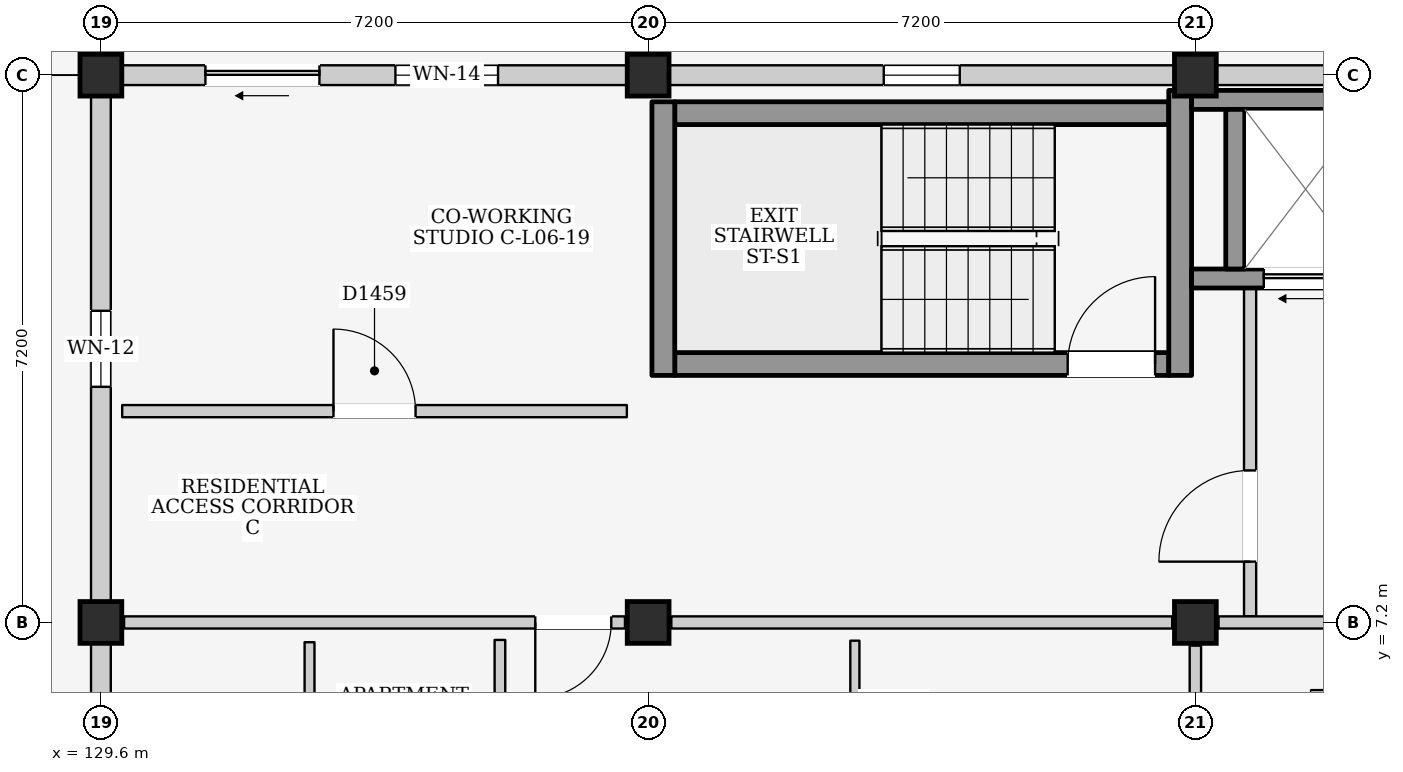
"""IFC4 building model, lengths in metres.
Left out: names, types, materials, properties, quantities, classifications, styles, units other than length and angle.
Written with IfcOpenShell. Run it as: python <this file> out.ifc"""

import sys

from ifc_helpers import new_model, si_unit, direction, frame, frame_2d, origin, origin_2d, place, context, subcontext, project, spatial, rectangle, extrude, element, fill, save


model = new_model("IFC4")
c1 = context("Model", 3, precision=1e-05, world=origin(), true_north=direction((0.0, 1.0)))
c2 = subcontext(c1, "Body", "Model", "MODEL_VIEW")
j1 = project(units=[si_unit("LENGTHUNIT", "METRE"), si_unit("PLANEANGLEUNIT", "RADIAN")], contexts=[c1])
p1 = place(None, origin())
s1 = spatial("IfcSite", under=j1, at=p1, CompositionType="ELEMENT")
p2 = place(p1, origin())
s2 = spatial("IfcBuilding", under=s1, at=p2, CompositionType="ELEMENT")
p3 = place(p2, frame((0.0, 0.0, 21.9)))
s3 = spatial("IfcBuildingStorey", under=s2, at=p3, CompositionType="ELEMENT", Elevation=21.9)
for number, where, z_axis, x_axis in (
    (1, (129.6, 7.2, 0.0), (0.0, 0.0, 1.0), (1.0, 0.0, 0.0)),
    (2, (129.6, 14.4, 0.0), (0.0, 0.0, 1.0), (1.0, 0.0, 0.0)),
    (3, (136.8, 7.2, 0.0), (0.0, 0.0, 1.0), (1.0, 0.0, 0.0)),
    (4, (136.8, 14.4, 0.0), (0.0, 0.0, 1.0), (1.0, 0.0, 0.0)),
    (5, (144.0, 7.2, 0.0), (0.0, 0.0, 1.0), (1.0, 0.0, 0.0)),
    (6, (144.0, 14.4, 0.0), (0.0, 0.0, 1.0), (1.0, 0.0, 0.0)),
):
    element("IfcColumn", number, at=place(p3, frame(where, z_axis=z_axis, x_axis=x_axis)), inside=s3, PredefinedType="COLUMN", context=c2, shape_type="SweptSolid", body=[
        extrude(rectangle(XDim=0.55, YDim=0.55, at=origin_2d()), origin(), (0.0, 0.0, 1.0), 3.2),
    ])
p4 = place(p3, frame((129.6, 0.275, 0.0), z_axis=(0.0, 0.0, 1.0), x_axis=(0.0, 1.0, 0.0)))
e7 = element("IfcWall", 7, at=p4, inside=s3, PredefinedType="ELEMENTEDWALL", context=c2, shape_type="SweptSolid", body=[
    extrude(rectangle(XDim=6.65, YDim=0.26, at=frame_2d((3.325, 0.0))), origin(), (0.0, 0.0, 1.0), 2.465),
])
p5 = place(p4, frame((1.4, 0.0, 0.0)))
e8 = element("IfcOpeningElement", 8, at=p5, cuts=e7, PredefinedType="OPENING", context=c2, shape_type="SweptSolid", body=[
    extrude(rectangle(XDim=1.4, YDim=2.1, at=frame_2d((0.7, 1.05))), frame((0.0, 0.145, 0.0), z_axis=(0.0, -1.0, 0.0), x_axis=(1.0, 0.0, 0.0)), (0.0, 0.0, 1.0), 0.29),
])
p6 = place(p4, frame((4.4, 0.0, 0.95)))
e9 = element("IfcOpeningElement", 9, at=p6, cuts=e7, PredefinedType="OPENING", context=c2, shape_type="SweptSolid", body=[
    extrude(rectangle(XDim=1.2, YDim=1.35, at=frame_2d((0.6, 0.675))), frame((0.0, 0.145, 0.0), z_axis=(0.0, -1.0, 0.0), x_axis=(1.0, 0.0, 0.0)), (0.0, 0.0, 1.0), 0.29),
])
p7 = place(p3, frame((129.875, 14.4, 0.0), z_axis=(0.0, 0.0, 1.0), x_axis=(1.0, 0.0, 0.0)))
e10 = element("IfcWall", 10, at=p7, inside=s3, PredefinedType="ELEMENTEDWALL", context=c2, shape_type="SweptSolid", body=[
    extrude(rectangle(XDim=6.65, YDim=0.26, at=frame_2d((3.325, 0.0))), origin(), (0.0, 0.0, 1.0), 2.365),
])
p8 = place(p7, frame((1.1, 0.0, 0.0)))
e11 = element("IfcOpeningElement", 11, at=p8, cuts=e10, PredefinedType="OPENING", context=c2, shape_type="SweptSolid", body=[
    extrude(rectangle(XDim=1.5, YDim=2.12, at=frame_2d((0.75, 1.06))), frame((0.0, 0.145, 0.0), z_axis=(0.0, -1.0, 0.0), x_axis=(1.0, 0.0, 0.0)), (0.0, 0.0, 1.0), 0.29),
])
p9 = place(p7, frame((3.6, 0.0, 0.755)))
e12 = element("IfcOpeningElement", 12, at=p9, cuts=e10, PredefinedType="OPENING", context=c2, shape_type="SweptSolid", body=[
    extrude(rectangle(XDim=1.35, YDim=1.5, at=frame_2d((0.675, 0.75))), frame((0.0, 0.145, 0.0), z_axis=(0.0, -1.0, 0.0), x_axis=(1.0, 0.0, 0.0)), (0.0, 0.0, 1.0), 0.29),
])
p10 = place(p3, frame((129.6, 7.475, 0.0), z_axis=(0.0, 0.0, 1.0), x_axis=(0.0, 1.0, 0.0)))
e13 = element("IfcWall", 13, at=p10, inside=s3, PredefinedType="ELEMENTEDWALL", context=c2, shape_type="SweptSolid", body=[
    extrude(rectangle(XDim=6.65, YDim=0.26, at=frame_2d((3.325, 0.0))), origin(), (0.0, 0.0, 1.0), 2.465),
])
p11 = place(p10, frame((2.825, 0.0, 1.1)))
e14 = element("IfcOpeningElement", 14, at=p11, cuts=e13, PredefinedType="OPENING", context=c2, shape_type="SweptSolid", body=[
    extrude(rectangle(XDim=1.0, YDim=0.9, at=frame_2d((0.5, 0.45))), frame((0.0, 0.145, 0.0), z_axis=(0.0, -1.0, 0.0), x_axis=(1.0, 0.0, 0.0)), (0.0, 0.0, 1.0), 0.29),
])
p12 = place(p3, frame((137.075, 14.4, 0.0), z_axis=(0.0, 0.0, 1.0), x_axis=(1.0, 0.0, 0.0)))
e15 = element("IfcWall", 15, at=p12, inside=s3, PredefinedType="ELEMENTEDWALL", context=c2, shape_type="SweptSolid", body=[
    extrude(rectangle(XDim=6.65, YDim=0.26, at=frame_2d((3.325, 0.0))), origin(), (0.0, 0.0, 1.0), 2.365),
])
p13 = place(p12, frame((2.825, 0.0, 1.2)))
e16 = element("IfcOpeningElement", 16, at=p13, cuts=e15, PredefinedType="OPENING", context=c2, shape_type="SweptSolid", body=[
    extrude(rectangle(XDim=1.0, YDim=0.9, at=frame_2d((0.5, 0.45))), frame((0.0, 0.145, 0.0), z_axis=(0.0, -1.0, 0.0), x_axis=(1.0, 0.0, 0.0)), (0.0, 0.0, 1.0), 0.29),
])
p14 = place(p3, frame((144.275, 14.4, 0.0), z_axis=(0.0, 0.0, 1.0), x_axis=(1.0, 0.0, 0.0)))
e17 = element("IfcWall", 17, at=p14, inside=s3, PredefinedType="ELEMENTEDWALL", context=c2, shape_type="SweptSolid", body=[
    extrude(rectangle(XDim=6.65, YDim=0.26, at=frame_2d((3.325, 0.0))), origin(), (0.0, 0.0, 1.0), 2.365),
])
p15 = place(p14, frame((2.825, 0.0, 1.2)))
e18 = element("IfcOpeningElement", 18, at=p15, cuts=e17, PredefinedType="OPENING", context=c2, shape_type="SweptSolid", body=[
    extrude(rectangle(XDim=1.0, YDim=0.9, at=frame_2d((0.5, 0.45))), frame((0.0, 0.145, 0.0), z_axis=(0.0, -1.0, 0.0), x_axis=(1.0, 0.0, 0.0)), (0.0, 0.0, 1.0), 0.29),
])
p16 = place(p3, frame((137.15, 10.6, 0.0), z_axis=(0.0, 0.0, 1.0), x_axis=(1.0, 0.0, 0.0)))
e19 = element("IfcWall", 19, at=p16, inside=s3, PredefinedType="SHEAR", context=c2, shape_type="SweptSolid", body=[
    extrude(rectangle(XDim=6.5, YDim=0.3, at=frame_2d((3.25, 0.0))), origin(), (0.0, 0.0, 1.0), 2.98),
])
p17 = place(p16, frame((5.17, 0.0, 0.0)))
e20 = element("IfcOpeningElement", 20, at=p17, cuts=e19, PredefinedType="OPENING", context=c2, shape_type="SweptSolid", body=[
    extrude(rectangle(XDim=1.15, YDim=2.2, at=frame_2d((0.575, 1.1))), frame((0.0, 0.165, 0.0), z_axis=(0.0, -1.0, 0.0), x_axis=(1.0, 0.0, 0.0)), (0.0, 0.0, 1.0), 0.33),
])
p18 = place(p3, frame((137.15, 13.9, 0.0), z_axis=(0.0, 0.0, 1.0), x_axis=(1.0, 0.0, 0.0)))
e21 = element("IfcWall", 21, at=p18, inside=s3, PredefinedType="SHEAR", context=c2, shape_type="SweptSolid", body=[
    extrude(rectangle(XDim=6.5, YDim=0.3, at=frame_2d((3.25, 0.0))), origin(), (0.0, 0.0, 1.0), 2.98),
])
p19 = place(p3, frame((137.0, 10.45, 0.0), z_axis=(0.0, 0.0, 1.0), x_axis=(0.0, 1.0, 0.0)))
e22 = element("IfcWall", 22, at=p19, inside=s3, PredefinedType="SHEAR", context=c2, shape_type="SweptSolid", body=[
    extrude(rectangle(XDim=3.6, YDim=0.3, at=frame_2d((1.8, 0.0))), origin(), (0.0, 0.0, 1.0), 2.98),
])
p20 = place(p3, frame((143.8, 10.45, 0.0), z_axis=(0.0, 0.0, 1.0), x_axis=(0.0, 1.0, 0.0)))
e23 = element("IfcWall", 23, at=p20, inside=s3, PredefinedType="SHEAR", context=c2, shape_type="SweptSolid", body=[
    extrude(rectangle(XDim=3.75, YDim=0.3, at=frame_2d((1.875, 0.0))), origin(), (0.0, 0.0, 1.0), 2.98),
])
p21 = place(p3, frame((144.72, 7.28, 0.0), z_axis=(0.0, 0.0, 1.0), x_axis=(0.0, 1.0, 0.0)))
e24 = element("IfcWall", 24, at=p21, inside=s3, PredefinedType="PARTITIONING", context=c2, shape_type="SweptSolid", body=[
    extrude(rectangle(XDim=4.32, YDim=0.16, at=frame_2d((2.16, 0.0))), origin(), (0.0, 0.0, 1.0), 2.98),
])
p22 = place(p21, frame((0.72, 0.0, 0.0)))
e25 = element("IfcOpeningElement", 25, at=p22, cuts=e24, PredefinedType="OPENING", context=c2, shape_type="SweptSolid", body=[
    extrude(rectangle(XDim=1.2, YDim=2.2, at=frame_2d((0.6, 1.1))), frame((0.0, 0.095, 0.0), z_axis=(0.0, -1.0, 0.0), x_axis=(1.0, 0.0, 0.0)), (0.0, 0.0, 1.0), 0.19),
])
p23 = place(p3, frame((143.95, 11.725, 0.0), z_axis=(0.0, 0.0, 1.0), x_axis=(1.0, 0.0, 0.0)))
e26 = element("IfcWall", 26, at=p23, inside=s3, PredefinedType="SHEAR", context=c2, shape_type="SweptSolid", body=[
    extrude(rectangle(XDim=2.55, YDim=0.25, at=frame_2d((1.275, 0.0))), origin(), (0.0, 0.0, 1.0), 2.98),
])
p24 = place(p23, frame((0.95, 0.0, 0.0)))
e27 = element("IfcOpeningElement", 27, at=p24, cuts=e26, PredefinedType="OPENING", context=c2, shape_type="SweptSolid", body=[
    extrude(rectangle(XDim=1.1, YDim=2.15, at=frame_2d((0.55, 1.075))), frame((0.0, 0.14, 0.0), z_axis=(0.0, -1.0, 0.0), x_axis=(1.0, 0.0, 0.0)), (0.0, 0.0, 1.0), 0.28),
])
p25 = place(p3, frame((143.95, 14.075, 0.0), z_axis=(0.0, 0.0, 1.0), x_axis=(1.0, 0.0, 0.0)))
e28 = element("IfcWall", 28, at=p25, inside=s3, PredefinedType="SHEAR", context=c2, shape_type="SweptSolid", body=[
    extrude(rectangle(XDim=2.55, YDim=0.25, at=frame_2d((1.275, 0.0))), origin(), (0.0, 0.0, 1.0), 2.98),
])
p26 = place(p3, frame((144.525, 11.85, 0.0), z_axis=(0.0, 0.0, 1.0), x_axis=(0.0, 1.0, 0.0)))
e29 = element("IfcWall", 29, at=p26, inside=s3, PredefinedType="SHEAR", context=c2, shape_type="SweptSolid", body=[
    extrude(rectangle(XDim=2.1, YDim=0.25, at=frame_2d((1.05, 0.0))), origin(), (0.0, 0.0, 1.0), 2.98),
])
p27 = place(p3, frame((129.905, 7.2, 0.0), z_axis=(0.0, 0.0, 1.0), x_axis=(1.0, 0.0, 0.0)))
e30 = element("IfcWall", 30, at=p27, inside=s3, PredefinedType="PARTITIONING", context=c2, shape_type="SweptSolid", body=[
    extrude(rectangle(XDim=6.59, YDim=0.16, at=frame_2d((3.295, 0.0))), origin(), (0.0, 0.0, 1.0), 2.365),
])
p28 = place(p27, frame((5.41, 0.0, 0.0)))
e31 = element("IfcOpeningElement", 31, at=p28, cuts=e30, PredefinedType="OPENING", context=c2, shape_type="SweptSolid", body=[
    extrude(rectangle(XDim=1.0, YDim=2.15, at=frame_2d((0.5, 1.075))), frame((0.0, 0.095, 0.0), z_axis=(0.0, -1.0, 0.0), x_axis=(1.0, 0.0, 0.0)), (0.0, 0.0, 1.0), 0.19),
])
p29 = place(p3, frame((137.105, 7.2, 0.0), z_axis=(0.0, 0.0, 1.0), x_axis=(1.0, 0.0, 0.0)))
e32 = element("IfcWall", 32, at=p29, inside=s3, PredefinedType="PARTITIONING", context=c2, shape_type="SweptSolid", body=[
    extrude(rectangle(XDim=6.59, YDim=0.16, at=frame_2d((3.295, 0.0))), origin(), (0.0, 0.0, 1.0), 2.365),
])
p30 = place(p3, frame((144.0, 0.305, 0.0), z_axis=(0.0, 0.0, 1.0), x_axis=(0.0, 1.0, 0.0)))
e33 = element("IfcWall", 33, at=p30, inside=s3, PredefinedType="PARTITIONING", context=c2, shape_type="SweptSolid", body=[
    extrude(rectangle(XDim=6.59, YDim=0.15, at=frame_2d((3.295, 0.0))), origin(), (0.0, 0.0, 1.0), 2.465),
])
p31 = place(p3, frame((132.345, 3.9, 0.0), z_axis=(0.0, 0.0, 1.0), x_axis=(0.0, 1.0, 0.0)))
e34 = element("IfcWall", 34, at=p31, inside=s3, PredefinedType="PARTITIONING", context=c2, shape_type="SweptSolid", body=[
    extrude(rectangle(XDim=3.04, YDim=0.13, at=frame_2d((1.52, 0.0))), origin(), (0.0, 0.0, 1.0), 2.98),
])
p32 = place(p3, frame((134.85, 3.91, 0.0), z_axis=(0.0, 0.0, 1.0), x_axis=(0.0, 1.0, 0.0)))
e35 = element("IfcWall", 35, at=p32, inside=s3, PredefinedType="PARTITIONING", context=c2, shape_type="SweptSolid", body=[
    extrude(rectangle(XDim=3.06, YDim=0.14, at=frame_2d((1.53, 0.0))), origin(), (0.0, 0.0, 1.0), 2.98),
])
p33 = place(p3, frame((139.52, 3.92, 0.0), z_axis=(0.0, 0.0, 1.0), x_axis=(0.0, 1.0, 0.0)))
e36 = element("IfcWall", 36, at=p33, inside=s3, PredefinedType="PARTITIONING", context=c2, shape_type="SweptSolid", body=[
    extrude(rectangle(XDim=3.04, YDim=0.12, at=frame_2d((1.52, 0.0))), origin(), (0.0, 0.0, 1.0), 2.98),
])
p34 = place(p33, frame((1.04, 0.0, 0.0)))
e37 = element("IfcOpeningElement", 37, at=p34, cuts=e36, PredefinedType="OPENING", context=c2, shape_type="SweptSolid", body=[
    extrude(rectangle(XDim=0.96, YDim=2.15, at=frame_2d((0.48, 1.075))), frame((0.0, 0.075, 0.0), z_axis=(0.0, -1.0, 0.0), x_axis=(1.0, 0.0, 0.0)), (0.0, 0.0, 1.0), 0.15),
])
p35 = place(p3, frame((144.305, 7.2, 0.0), z_axis=(0.0, 0.0, 1.0), x_axis=(1.0, 0.0, 0.0)))
e38 = element("IfcWall", 38, at=p35, inside=s3, PredefinedType="PARTITIONING", context=c2, shape_type="SweptSolid", body=[
    extrude(rectangle(XDim=6.59, YDim=0.16, at=frame_2d((3.295, 0.0))), origin(), (0.0, 0.0, 1.0), 2.365),
])
p36 = place(p35, frame((4.145, 0.0, 0.0)))
e39 = element("IfcOpeningElement", 39, at=p36, cuts=e38, PredefinedType="OPENING", context=c2, shape_type="SweptSolid", body=[
    extrude(rectangle(XDim=1.0, YDim=2.15, at=frame_2d((0.5, 1.075))), frame((0.0, 0.095, 0.0), z_axis=(0.0, -1.0, 0.0), x_axis=(1.0, 0.0, 0.0)), (0.0, 0.0, 1.0), 0.19),
])
p37 = place(p3, frame((129.88, 9.98, 0.0), z_axis=(0.0, 0.0, 1.0), x_axis=(1.0, 0.0, 0.0)))
e40 = element("IfcWall", 40, at=p37, inside=s3, PredefinedType="PARTITIONING", context=c2, shape_type="SweptSolid", body=[
    extrude(rectangle(XDim=6.64, YDim=0.16, at=frame_2d((3.32, 0.0))), origin(), (0.0, 0.0, 1.0), 2.98),
])
p38 = place(p37, frame((2.78, 0.0, 0.0)))
e41 = element("IfcOpeningElement", 41, at=p38, cuts=e40, PredefinedType="OPENING", context=c2, shape_type="SweptSolid", body=[
    extrude(rectangle(XDim=1.08, YDim=2.22, at=frame_2d((0.54, 1.11))), frame((0.0, 0.095, 0.0), z_axis=(0.0, -1.0, 0.0), x_axis=(1.0, 0.0, 0.0)), (0.0, 0.0, 1.0), 0.19),
])
p39 = place(p8, frame((1.5, 0.0, 0.0), z_axis=(0.0, 0.0, 1.0), x_axis=(-1.0, 0.0, 0.0)))
e42 = element("IfcDoor", 42, at=p39, inside=s3, OperationType="SLIDING_TO_LEFT", PredefinedType="DOOR", context=c2, shape_type="SweptSolid", body=[
    extrude(rectangle(XDim=1.5, YDim=2.12, at=frame_2d((0.75, 1.06))), frame((0.0, 0.025, 0.0), z_axis=(0.0, -1.0, 0.0), x_axis=(1.0, 0.0, 0.0)), (0.0, 0.0, 1.0), 0.05),
])
fill(e11, e42)
p40 = place(p9, origin())
e43 = element("IfcWindow", 43, at=p40, inside=s3, PartitioningType="SINGLE_PANEL", PredefinedType="WINDOW", context=c2, shape_type="SweptSolid", body=[
    extrude(rectangle(XDim=1.35, YDim=1.5, at=frame_2d((0.675, 0.75))), frame((0.0, 0.03, 0.0), z_axis=(0.0, -1.0, 0.0), x_axis=(1.0, 0.0, 0.0)), (0.0, 0.0, 1.0), 0.06),
])
fill(e12, e43)
p41 = place(p11, origin())
e44 = element("IfcWindow", 44, at=p41, inside=s3, PartitioningType="SINGLE_PANEL", PredefinedType="WINDOW", context=c2, shape_type="SweptSolid", body=[
    extrude(rectangle(XDim=1.0, YDim=0.9, at=frame_2d((0.5, 0.45))), frame((0.0, 0.03, 0.0), z_axis=(0.0, -1.0, 0.0), x_axis=(1.0, 0.0, 0.0)), (0.0, 0.0, 1.0), 0.06),
])
fill(e14, e44)
p42 = place(p13, origin())
e45 = element("IfcWindow", 45, at=p42, inside=s3, PartitioningType="SINGLE_PANEL", PredefinedType="WINDOW", context=c2, shape_type="SweptSolid", body=[
    extrude(rectangle(XDim=1.0, YDim=0.9, at=frame_2d((0.5, 0.45))), frame((0.0, 0.03, 0.0), z_axis=(0.0, -1.0, 0.0), x_axis=(1.0, 0.0, 0.0)), (0.0, 0.0, 1.0), 0.06),
])
fill(e16, e45)
p43 = place(p17, origin())
e46 = element("IfcDoor", 46, at=p43, inside=s3, OperationType="SINGLE_SWING_RIGHT", PredefinedType="DOOR", context=c2, shape_type="SweptSolid", body=[
    extrude(rectangle(XDim=1.15, YDim=2.2, at=frame_2d((0.575, 1.1))), frame((0.0, 0.025, 0.0), z_axis=(0.0, -1.0, 0.0), x_axis=(1.0, 0.0, 0.0)), (0.0, 0.0, 1.0), 0.05),
])
fill(e20, e46)
p44 = place(p22, origin())
e47 = element("IfcDoor", 47, at=p44, inside=s3, OperationType="SINGLE_SWING_LEFT", PredefinedType="DOOR", context=c2, shape_type="SweptSolid", body=[
    extrude(rectangle(XDim=1.2, YDim=2.2, at=frame_2d((0.6, 1.1))), frame((0.0, 0.025, 0.0), z_axis=(0.0, -1.0, 0.0), x_axis=(1.0, 0.0, 0.0)), (0.0, 0.0, 1.0), 0.05),
])
fill(e25, e47)
p45 = place(p24, frame((1.1, 0.0, 0.0), z_axis=(0.0, 0.0, 1.0), x_axis=(-1.0, 0.0, 0.0)))
e48 = element("IfcDoor", 48, at=p45, inside=s3, OperationType="SLIDING_TO_LEFT", PredefinedType="DOOR", context=c2, shape_type="SweptSolid", body=[
    extrude(rectangle(XDim=1.1, YDim=2.15, at=frame_2d((0.55, 1.075))), frame((0.0, 0.025, 0.0), z_axis=(0.0, -1.0, 0.0), x_axis=(1.0, 0.0, 0.0)), (0.0, 0.0, 1.0), 0.05),
])
fill(e27, e48)
p46 = place(p28, frame((1.0, 0.0, 0.0), z_axis=(0.0, 0.0, 1.0), x_axis=(-1.0, 0.0, 0.0)))
e49 = element("IfcDoor", 49, at=p46, inside=s3, OperationType="SINGLE_SWING_RIGHT", PredefinedType="DOOR", context=c2, shape_type="SweptSolid", body=[
    extrude(rectangle(XDim=1.0, YDim=2.15, at=frame_2d((0.5, 1.075))), frame((0.0, 0.025, 0.0), z_axis=(0.0, -1.0, 0.0), x_axis=(1.0, 0.0, 0.0)), (0.0, 0.0, 1.0), 0.05),
])
fill(e31, e49)
p47 = place(p38, origin())
e50 = element("IfcDoor", 50, at=p47, inside=s3, OperationType="SINGLE_SWING_LEFT", PredefinedType="DOOR", context=c2, shape_type="SweptSolid", body=[
    extrude(rectangle(XDim=1.08, YDim=2.22, at=frame_2d((0.54, 1.11))), frame((0.0, 0.025, 0.0), z_axis=(0.0, -1.0, 0.0), x_axis=(1.0, 0.0, 0.0)), (0.0, 0.0, 1.0), 0.05),
])
fill(e41, e50)
save(model, sys.argv[1])
